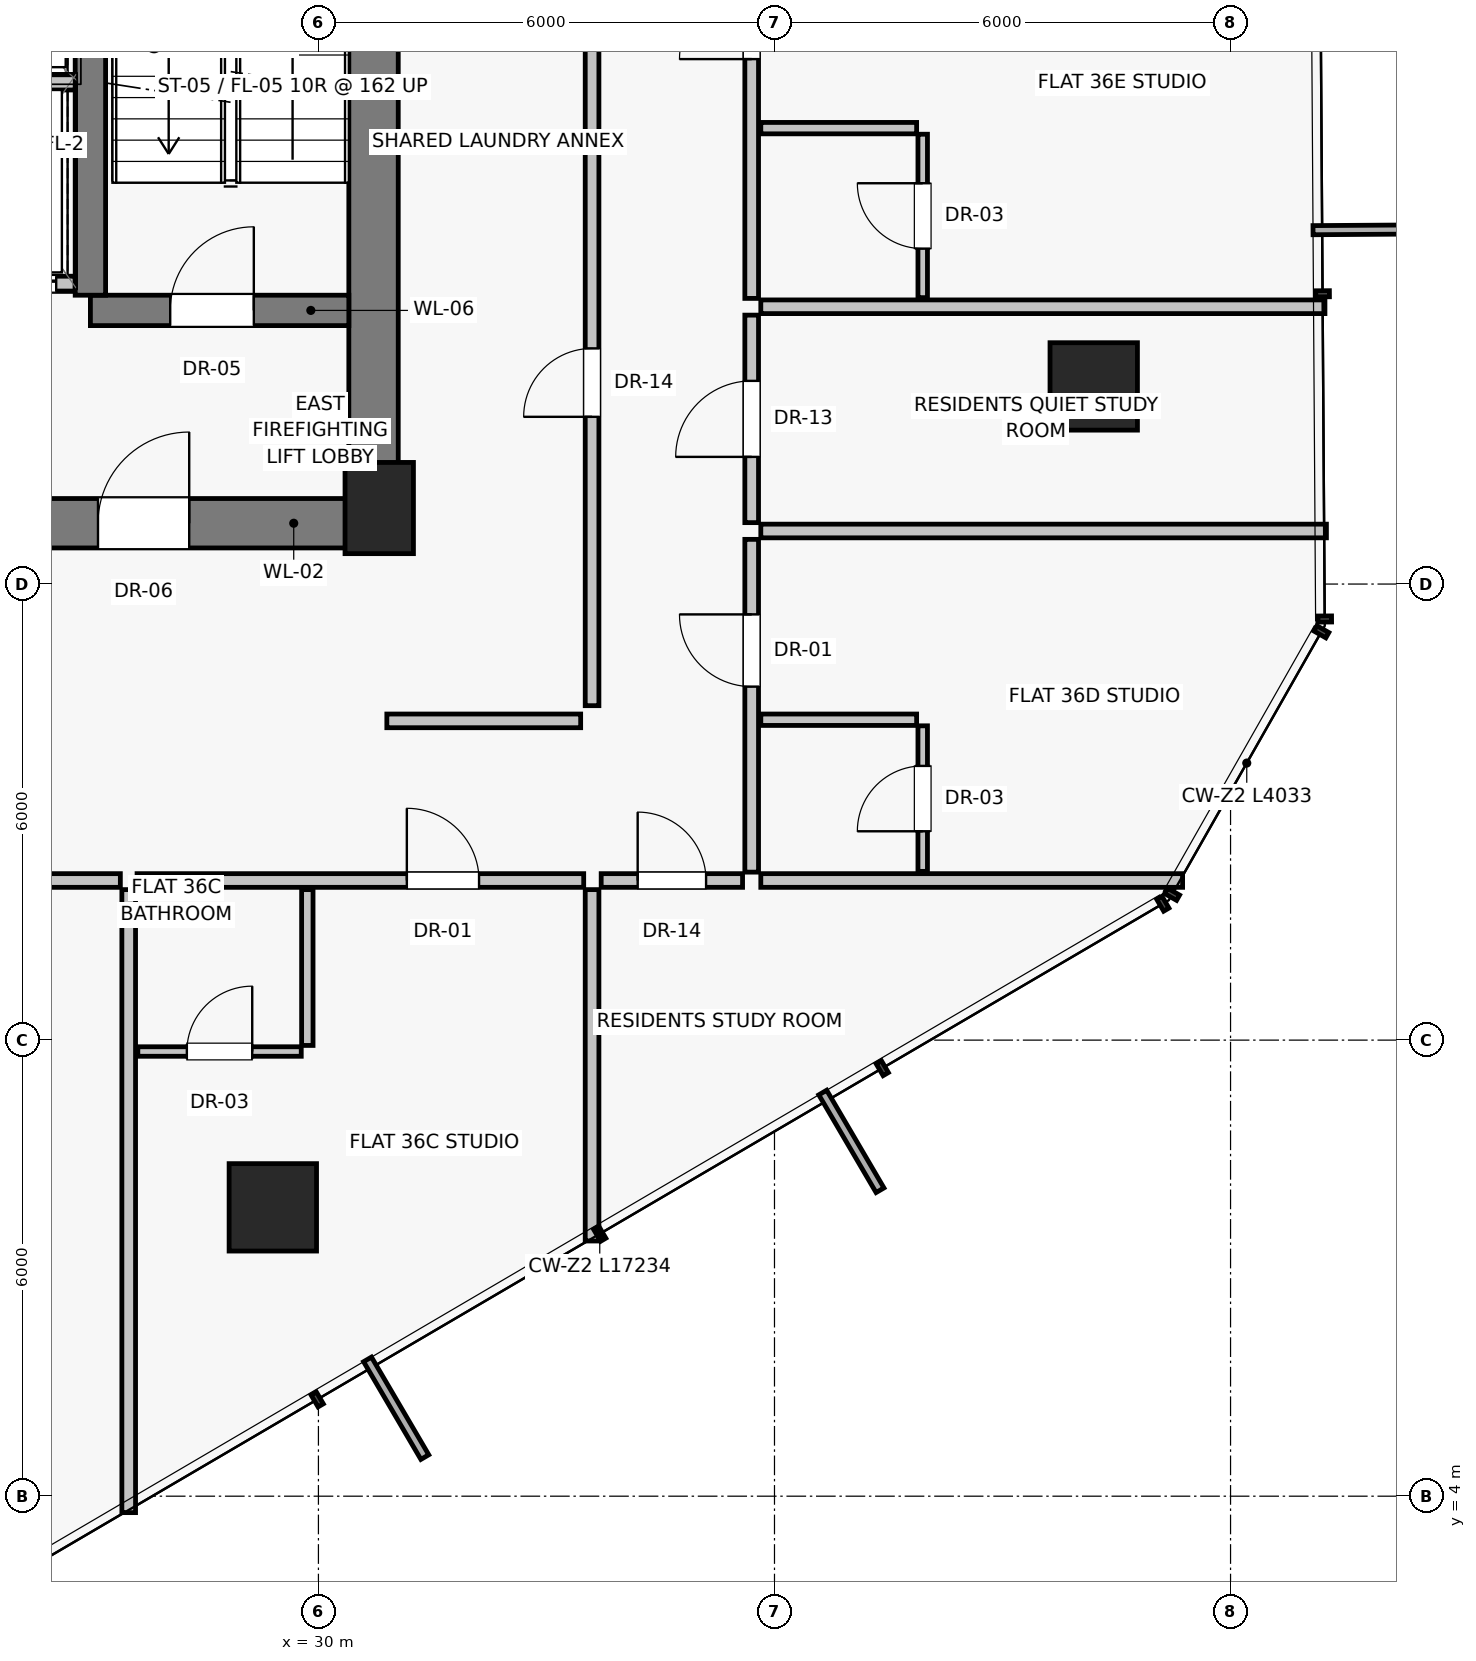
"""IFC4 building model, lengths in metres.
Left out: names, types, materials, properties, quantities, classifications, styles, units other than length and angle.
Written with IfcOpenShell. Run it as: python <this file> out.ifc"""

import sys

from ifc_helpers import new_model, si_unit, direction, frame, frame_2d, origin, origin_2d, place, context, subcontext, project, spatial, rectangle, extrude, source, transform, mapped, element, fill, save


model = new_model("IFC4")
c1 = context("Model", 3, precision=1e-05, world=origin(), true_north=direction((0.0, 1.0)))
c2 = subcontext(c1, "Body", "Model", "MODEL_VIEW")
j1 = project(units=[si_unit("LENGTHUNIT", "METRE"), si_unit("PLANEANGLEUNIT", "RADIAN")], contexts=[c1])
p1 = place(None, origin())
s1 = spatial("IfcSite", under=j1, at=p1, CompositionType="ELEMENT")
p2 = place(p1, origin())
s2 = spatial("IfcBuilding", under=s1, at=p2, CompositionType="ELEMENT")
p3 = place(p2, frame((0.0, 0.0, 129.5)))
s3 = spatial("IfcBuildingStorey", under=s2, at=p3, CompositionType="ELEMENT", Elevation=129.5)
p4 = place(p3, frame((30.8, 17.0, 0.0), z_axis=(0.0, 0.0, 1.0), x_axis=(1.0, 0.0, 0.0)))
e1 = element("IfcColumn", 1, at=p4, inside=s3, PredefinedType="PILASTER", context=c2, shape_type="SweptSolid", body=[
    extrude(rectangle(XDim=0.9, YDim=1.2, at=origin_2d()), origin(), (0.0, 0.0, 1.0), 3.25),
])
for number, where, z_axis, x_axis in (
    (2, (40.2, 18.6, 0.0), (0.0, 0.0, 1.0), (1.0, 0.0, 0.0)),
    (3, (29.4, 7.8, 0.0), (0.0, 0.0, 1.0), (1.0, 0.0, 0.0)),
):
    element("IfcColumn", number, at=place(p3, frame(where, z_axis=z_axis, x_axis=x_axis)), inside=s3, PredefinedType="COLUMN", context=c2, shape_type="SweptSolid", body=[
        extrude(rectangle(XDim=1.15, YDim=1.15, at=origin_2d()), origin(), (0.0, 0.0, 1.0), 3.25),
    ])
p5 = place(p3, frame((30.725, 16.8, 0.0), z_axis=(0.0, 0.0, 1.0), x_axis=(0.0, 1.0, 0.0)))
e4 = element("IfcWall", 4, at=p5, inside=s3, PredefinedType="SHEAR", context=c2, shape_type="SweptSolid", body=[
    extrude(rectangle(XDim=14.2, YDim=0.65, at=frame_2d((7.1, 0.0))), origin(), (0.0, 0.0, 1.0), 3.0),
])
p6 = place(p3, frame((24.95, 16.8, 0.0), z_axis=(0.0, 0.0, 1.0), x_axis=(1.0, 0.0, 0.0)))
e5 = element("IfcWall", 5, at=p6, inside=s3, PredefinedType="SHEAR", context=c2, shape_type="SweptSolid", body=[
    extrude(rectangle(XDim=5.85, YDim=0.65, at=frame_2d((2.925, 0.0))), origin(), (0.0, 0.0, 1.0), 3.0),
])
p7 = place(p6, frame((2.15, 0.0, 0.0)))
e6 = element("IfcOpeningElement", 6, at=p7, cuts=e5, PredefinedType="OPENING", context=c2, shape_type="SweptSolid", body=[
    extrude(rectangle(XDim=1.2, YDim=2.03, at=frame_2d((0.6, 1.015))), frame((0.0, 0.335, 0.0), z_axis=(0.0, -1.0, 0.0), x_axis=(1.0, 0.0, 0.0)), (0.0, 0.0, 1.0), 0.67),
])
p8 = place(p3, frame((24.95, 19.95, 0.0), z_axis=(0.0, 0.0, 1.0), x_axis=(1.0, 0.0, 0.0)))
e7 = element("IfcWall", 7, at=p8, inside=s3, PredefinedType="SOLIDWALL", context=c2, shape_type="SweptSolid", body=[
    extrude(rectangle(XDim=1.85, YDim=0.2, at=frame_2d((0.925, 0.0))), origin(), (0.0, 0.0, 1.0), 3.0),
])
p9 = place(p8, frame((0.3, 0.0, 0.0)))
e8 = element("IfcOpeningElement", 8, at=p9, cuts=e7, PredefinedType="OPENING", context=c2, shape_type="SweptSolid", body=[
    extrude(rectangle(XDim=1.3, YDim=2.25, at=frame_2d((0.65, 1.125))), frame((0.0, 0.11, 0.0), z_axis=(0.0, -1.0, 0.0), x_axis=(1.0, 0.0, 0.0)), (0.0, 0.0, 1.0), 0.22),
])
p10 = place(p3, frame((27.0, 19.6, 0.0), z_axis=(0.0, 0.0, 1.0), x_axis=(1.0, 0.0, 0.0)))
e9 = element("IfcWall", 9, at=p10, inside=s3, PredefinedType="SHEAR", context=c2, shape_type="SweptSolid", body=[
    extrude(rectangle(XDim=3.4, YDim=0.4, at=frame_2d((1.7, 0.0))), origin(), (0.0, 0.0, 1.0), 3.0),
])
p11 = place(p10, frame((1.05, 0.0, 0.0)))
e10 = element("IfcOpeningElement", 10, at=p11, cuts=e9, PredefinedType="OPENING", context=c2, shape_type="SweptSolid", body=[
    extrude(rectangle(XDim=1.1, YDim=2.03, at=frame_2d((0.55, 1.015))), frame((0.0, 0.21, 0.0), z_axis=(0.0, -1.0, 0.0), x_axis=(1.0, 0.0, 0.0)), (0.0, 0.0, 1.0), 0.42),
])
p12 = place(p3, frame((27.0, 19.8, 0.0), z_axis=(0.0, 0.0, 1.0), x_axis=(0.0, 1.0, 0.0)))
e11 = element("IfcWall", 11, at=p12, inside=s3, PredefinedType="SHEAR", context=c2, shape_type="SweptSolid", body=[
    extrude(rectangle(XDim=8.8, YDim=0.4, at=frame_2d((4.4, 0.0))), origin(), (0.0, 0.0, 1.0), 3.0),
])
p13 = place(p3, frame((24.85, 22.6, 0.0), z_axis=(0.0, 0.0, 1.0), x_axis=(1.0, 0.0, 0.0)))
e12 = element("IfcWall", 12, at=p13, inside=s3, PredefinedType="SOLIDWALL", context=c2, shape_type="SweptSolid", body=[
    extrude(rectangle(XDim=1.95, YDim=0.2, at=frame_2d((0.975, 0.0))), origin(), (0.0, 0.0, 1.0), 3.0),
])
p14 = place(p3, frame((33.6, 14.4, 0.0), z_axis=(0.0, 0.0, 1.0), x_axis=(0.0, 1.0, 0.0)))
e13 = element("IfcWall", 13, at=p14, inside=s3, PredefinedType="PARTITIONING", context=c2, shape_type="SweptSolid", body=[
    extrude(rectangle(XDim=9.4, YDim=0.18, at=frame_2d((4.7, 0.0))), origin(), (0.0, 0.0, 1.0), 3.0),
])
p15 = place(p14, frame((3.8, 0.0, 0.0)))
e14 = element("IfcOpeningElement", 14, at=p15, cuts=e13, PredefinedType="OPENING", context=c2, shape_type="SweptSolid", body=[
    extrude(rectangle(XDim=0.9, YDim=2.01, at=frame_2d((0.45, 1.005))), frame((0.0, 0.1, 0.0), z_axis=(0.0, -1.0, 0.0), x_axis=(1.0, 0.0, 0.0)), (0.0, 0.0, 1.0), 0.2),
])
p16 = place(p3, frame((30.9, 14.2, 0.0), z_axis=(0.0, 0.0, 1.0), x_axis=(1.0, 0.0, 0.0)))
e15 = element("IfcWall", 15, at=p16, inside=s3, PredefinedType="PARTITIONING", context=c2, shape_type="SweptSolid", body=[
    extrude(rectangle(XDim=2.55, YDim=0.18, at=frame_2d((1.275, 0.0))), origin(), (0.0, 0.0, 1.0), 3.0),
])
p17 = place(p3, frame((33.6, 11.98, 0.0), z_axis=(0.0, 0.0, 1.0), x_axis=(0.0, -1.0, 0.0)))
e16 = element("IfcWall", 16, at=p17, inside=s3, PredefinedType="PARTITIONING", context=c2, shape_type="SweptSolid", body=[
    extrude(rectangle(XDim=4.623, YDim=0.18, at=frame_2d((2.311, 0.0))), origin(), (0.0, 0.0, 1.0), 3.0),
])
p18 = place(p3, frame((20.606, 12.1, 0.0), z_axis=(0.0, 0.0, 1.0), x_axis=(1.0, 0.0, 0.0)))
e17 = element("IfcWall", 17, at=p18, inside=s3, PredefinedType="PARTITIONING", context=c2, shape_type="SweptSolid", body=[
    extrude(rectangle(XDim=6.788, YDim=0.18, at=frame_2d((3.394, 0.0))), origin(), (0.0, 0.0, 1.0), 2.58),
])
p19 = place(p18, frame((4.224, 0.0, 0.0)))
e18 = element("IfcOpeningElement", 18, at=p19, cuts=e17, PredefinedType="OPENING", context=c2, shape_type="SweptSolid", body=[
    extrude(rectangle(XDim=0.95, YDim=2.02, at=frame_2d((0.475, 1.01))), frame((0.0, 0.1, 0.0), z_axis=(0.0, -1.0, 0.0), x_axis=(1.0, 0.0, 0.0)), (0.0, 0.0, 1.0), 0.2),
])
p20 = place(p3, frame((27.504, 11.98, 0.0), z_axis=(0.0, 0.0, 1.0), x_axis=(0.0, -1.0, 0.0)))
e19 = element("IfcWall", 19, at=p20, inside=s3, PredefinedType="PARTITIONING", context=c2, shape_type="SweptSolid", body=[
    extrude(rectangle(XDim=8.196, YDim=0.18, at=frame_2d((4.098, 0.0))), origin(), (0.0, 0.0, 1.0), 3.0),
])
p21 = place(p3, frame((27.614, 12.1, 0.0), z_axis=(0.0, 0.0, 1.0), x_axis=(1.0, 0.0, 0.0)))
e20 = element("IfcWall", 20, at=p21, inside=s3, PredefinedType="PARTITIONING", context=c2, shape_type="SweptSolid", body=[
    extrude(rectangle(XDim=5.876, YDim=0.18, at=frame_2d((2.938, 0.0))), origin(), (0.0, 0.0, 1.0), 2.58),
])
p22 = place(p21, frame((3.549, 0.0, 0.0)))
e21 = element("IfcOpeningElement", 21, at=p22, cuts=e20, PredefinedType="OPENING", context=c2, shape_type="SweptSolid", body=[
    extrude(rectangle(XDim=0.95, YDim=2.02, at=frame_2d((0.475, 1.01))), frame((0.0, 0.1, 0.0), z_axis=(0.0, -1.0, 0.0), x_axis=(1.0, 0.0, 0.0)), (0.0, 0.0, 1.0), 0.2),
])
p23 = place(p3, frame((29.854, 11.98, 0.0), z_axis=(0.0, 0.0, 1.0), x_axis=(0.0, -1.0, 0.0)))
e22 = element("IfcWall", 22, at=p23, inside=s3, PredefinedType="PARTITIONING", context=c2, shape_type="SweptSolid", body=[
    extrude(rectangle(XDim=2.05, YDim=0.15, at=frame_2d((1.025, 0.0))), origin(), (0.0, 0.0, 1.0), 2.378),
])
p24 = place(p3, frame((27.624, 9.85, 0.0), z_axis=(0.0, 0.0, 1.0), x_axis=(1.0, 0.0, 0.0)))
e23 = element("IfcWall", 23, at=p24, inside=s3, PredefinedType="PARTITIONING", context=c2, shape_type="SweptSolid", body=[
    extrude(rectangle(XDim=2.15, YDim=0.125, at=frame_2d((1.075, 0.0))), origin(), (0.0, 0.0, 1.0), 3.0),
])
p25 = place(p24, frame((0.645, 0.0, 0.0)))
e24 = element("IfcOpeningElement", 24, at=p25, cuts=e23, PredefinedType="OPENING", context=c2, shape_type="SweptSolid", body=[
    extrude(rectangle(XDim=0.86, YDim=2.01, at=frame_2d((0.43, 1.005))), frame((0.0, 0.073, 0.0), z_axis=(0.0, -1.0, 0.0), x_axis=(1.0, 0.0, 0.0)), (0.0, 0.0, 1.0), 0.145),
])
p26 = place(p3, frame((35.82, 12.1, 0.0), z_axis=(0.0, 0.0, 1.0), x_axis=(1.0, 0.0, 0.0)))
e25 = element("IfcWall", 25, at=p26, inside=s3, PredefinedType="PARTITIONING", context=c2, shape_type="SweptSolid", body=[
    extrude(rectangle(XDim=5.549, YDim=0.18, at=frame_2d((2.775, 0.0))), origin(), (0.0, 0.0, 1.0), 3.0),
])
p27 = place(p3, frame((35.7, 16.808, 0.0), z_axis=(0.0, 0.0, 1.0), x_axis=(0.0, 1.0, 0.0)))
e26 = element("IfcWall", 26, at=p27, inside=s3, PredefinedType="PARTITIONING", context=c2, shape_type="SweptSolid", body=[
    extrude(rectangle(XDim=2.73, YDim=0.18, at=frame_2d((1.365, 0.0))), origin(), (0.0, 0.0, 1.0), 2.58),
])
p28 = place(p27, frame((0.865, 0.0, 0.0)))
e27 = element("IfcOpeningElement", 27, at=p28, cuts=e26, PredefinedType="OPENING", context=c2, shape_type="SweptSolid", body=[
    extrude(rectangle(XDim=1.0, YDim=2.01, at=frame_2d((0.5, 1.005))), frame((0.0, 0.1, 0.0), z_axis=(0.0, -1.0, 0.0), x_axis=(1.0, 0.0, 0.0)), (0.0, 0.0, 1.0), 0.2),
])
p29 = place(p3, frame((35.82, 16.698, 0.0), z_axis=(0.0, 0.0, 1.0), x_axis=(1.0, 0.0, 0.0)))
e28 = element("IfcWall", 28, at=p29, inside=s3, PredefinedType="PARTITIONING", context=c2, shape_type="SweptSolid", body=[
    extrude(rectangle(XDim=7.441, YDim=0.18, at=frame_2d((3.721, 0.0))), origin(), (0.0, 0.0, 1.0), 3.0),
])
p30 = place(p3, frame((35.7, 12.21, 0.0), z_axis=(0.0, 0.0, 1.0), x_axis=(0.0, 1.0, 0.0)))
e29 = element("IfcWall", 29, at=p30, inside=s3, PredefinedType="PARTITIONING", context=c2, shape_type="SweptSolid", body=[
    extrude(rectangle(XDim=4.378, YDim=0.18, at=frame_2d((2.189, 0.0))), origin(), (0.0, 0.0, 1.0), 3.0),
])
p31 = place(p30, frame((2.441, 0.0, 0.0)))
e30 = element("IfcOpeningElement", 30, at=p31, cuts=e29, PredefinedType="OPENING", context=c2, shape_type="SweptSolid", body=[
    extrude(rectangle(XDim=0.95, YDim=2.02, at=frame_2d((0.475, 1.01))), frame((0.0, 0.1, 0.0), z_axis=(0.0, -1.0, 0.0), x_axis=(1.0, 0.0, 0.0)), (0.0, 0.0, 1.0), 0.2),
])
p32 = place(p3, frame((35.82, 14.215, 0.0), z_axis=(0.0, 0.0, 1.0), x_axis=(1.0, 0.0, 0.0)))
e31 = element("IfcWall", 31, at=p32, inside=s3, PredefinedType="PARTITIONING", context=c2, shape_type="SweptSolid", body=[
    extrude(rectangle(XDim=2.05, YDim=0.15, at=frame_2d((1.025, 0.0))), origin(), (0.0, 0.0, 1.0), 3.0),
])
p33 = place(p3, frame((37.95, 12.22, 0.0), z_axis=(0.0, 0.0, 1.0), x_axis=(0.0, 1.0, 0.0)))
e32 = element("IfcWall", 32, at=p33, inside=s3, PredefinedType="PARTITIONING", context=c2, shape_type="SweptSolid", body=[
    extrude(rectangle(XDim=1.915, YDim=0.125, at=frame_2d((0.958, 0.0))), origin(), (0.0, 0.0, 1.0), 3.0),
])
p34 = place(p33, frame((0.528, 0.0, 0.0)))
e33 = element("IfcOpeningElement", 33, at=p34, cuts=e32, PredefinedType="OPENING", context=c2, shape_type="SweptSolid", body=[
    extrude(rectangle(XDim=0.86, YDim=2.01, at=frame_2d((0.43, 1.005))), frame((0.0, 0.073, 0.0), z_axis=(0.0, -1.0, 0.0), x_axis=(1.0, 0.0, 0.0)), (0.0, 0.0, 1.0), 0.145),
])
p35 = place(p3, frame((35.82, 19.648, 0.0), z_axis=(0.0, 0.0, 1.0), x_axis=(1.0, 0.0, 0.0)))
e34 = element("IfcWall", 34, at=p35, inside=s3, PredefinedType="PARTITIONING", context=c2, shape_type="SweptSolid", body=[
    extrude(rectangle(XDim=7.422, YDim=0.18, at=frame_2d((3.711, 0.0))), origin(), (0.0, 0.0, 1.0), 3.0),
])
p36 = place(p3, frame((35.7, 19.758, 0.0), z_axis=(0.0, 0.0, 1.0), x_axis=(0.0, 1.0, 0.0)))
e35 = element("IfcWall", 35, at=p36, inside=s3, PredefinedType="PARTITIONING", context=c2, shape_type="SweptSolid", body=[
    extrude(rectangle(XDim=5.334, YDim=0.18, at=frame_2d((2.667, 0.0))), origin(), (0.0, 0.0, 1.0), 2.58),
])
p37 = place(p36, frame((3.148, 0.0, 0.0)))
e36 = element("IfcOpeningElement", 36, at=p37, cuts=e35, PredefinedType="OPENING", context=c2, shape_type="SweptSolid", body=[
    extrude(rectangle(XDim=0.95, YDim=2.02, at=frame_2d((0.475, 1.01))), frame((0.0, 0.1, 0.0), z_axis=(0.0, -1.0, 0.0), x_axis=(1.0, 0.0, 0.0)), (0.0, 0.0, 1.0), 0.2),
])
p38 = place(p3, frame((35.82, 21.998, 0.0), z_axis=(0.0, 0.0, 1.0), x_axis=(1.0, 0.0, 0.0)))
e37 = element("IfcWall", 37, at=p38, inside=s3, PredefinedType="PARTITIONING", context=c2, shape_type="SweptSolid", body=[
    extrude(rectangle(XDim=2.05, YDim=0.15, at=frame_2d((1.025, 0.0))), origin(), (0.0, 0.0, 1.0), 3.0),
])
p39 = place(p3, frame((37.95, 19.768, 0.0), z_axis=(0.0, 0.0, 1.0), x_axis=(0.0, 1.0, 0.0)))
e38 = element("IfcWall", 38, at=p39, inside=s3, PredefinedType="PARTITIONING", context=c2, shape_type="SweptSolid", body=[
    extrude(rectangle(XDim=2.15, YDim=0.125, at=frame_2d((1.075, 0.0))), origin(), (0.0, 0.0, 1.0), 3.0),
])
p40 = place(p39, frame((0.645, 0.0, 0.0)))
e39 = element("IfcOpeningElement", 39, at=p40, cuts=e38, PredefinedType="OPENING", context=c2, shape_type="SweptSolid", body=[
    extrude(rectangle(XDim=0.86, YDim=2.01, at=frame_2d((0.43, 1.005))), frame((0.0, 0.073, 0.0), z_axis=(0.0, -1.0, 0.0), x_axis=(1.0, 0.0, 0.0)), (0.0, 0.0, 1.0), 0.145),
])
p41 = place(p3, frame((33.72, 12.1, 0.0), z_axis=(0.0, 0.0, 1.0), x_axis=(1.0, 0.0, 0.0)))
e40 = element("IfcWall", 40, at=p41, inside=s3, PredefinedType="PARTITIONING", context=c2, shape_type="SweptSolid", body=[
    extrude(rectangle(XDim=1.86, YDim=0.18, at=frame_2d((0.93, 0.0))), origin(), (0.0, 0.0, 1.0), 3.0),
])
p42 = place(p41, frame((0.48, 0.0, 0.0)))
e41 = element("IfcOpeningElement", 41, at=p42, cuts=e40, PredefinedType="OPENING", context=c2, shape_type="SweptSolid", body=[
    extrude(rectangle(XDim=0.9, YDim=2.01, at=frame_2d((0.45, 1.005))), frame((0.0, 0.1, 0.0), z_axis=(0.0, -1.0, 0.0), x_axis=(1.0, 0.0, 0.0)), (0.0, 0.0, 1.0), 0.2),
])
m1 = source(origin(), c2, "Body", "SweptSolid", [
    extrude(rectangle(XDim=1.2, YDim=2.03, at=frame_2d((0.6, 1.015))), frame((0.0, 0.025, 0.0), z_axis=(0.0, -1.0, 0.0), x_axis=(1.0, 0.0, 0.0)), (0.0, 0.0, 1.0), 0.05),
])
p43 = place(p7, origin())
e42 = element("IfcDoor", 42, at=p43, inside=s3, OperationType="SINGLE_SWING_RIGHT", PredefinedType="DOOR", context=c2, shape_type="MappedRepresentation", body=[
    mapped(m1, transform((0.0, 0.0, 0.0), scale=1.0)),
])
fill(e6, e42)
m2 = source(origin(), c2, "Body", "SweptSolid", [
    extrude(rectangle(XDim=1.3, YDim=2.25, at=frame_2d((0.65, 1.125))), frame((0.0, 0.025, 0.0), z_axis=(0.0, -1.0, 0.0), x_axis=(1.0, 0.0, 0.0)), (0.0, 0.0, 1.0), 0.05),
])
p44 = place(p9, origin())
e43 = element("IfcDoor", 43, at=p44, inside=s3, OperationType="SLIDING_TO_LEFT", PredefinedType="DOOR", context=c2, shape_type="MappedRepresentation", body=[
    mapped(m2, transform((0.0, 0.0, 0.0), scale=1.0)),
])
fill(e8, e43)
m3 = source(origin(), c2, "Body", "SweptSolid", [
    extrude(rectangle(XDim=1.1, YDim=2.03, at=frame_2d((0.55, 1.015))), frame((0.0, 0.025, 0.0), z_axis=(0.0, -1.0, 0.0), x_axis=(1.0, 0.0, 0.0)), (0.0, 0.0, 1.0), 0.05),
])
p45 = place(p11, origin())
e44 = element("IfcDoor", 44, at=p45, inside=s3, OperationType="SINGLE_SWING_RIGHT", PredefinedType="DOOR", context=c2, shape_type="MappedRepresentation", body=[
    mapped(m3, transform((0.0, 0.0, 0.0), scale=1.0)),
])
fill(e10, e44)
m4 = source(origin(), c2, "Body", "SweptSolid", [
    extrude(rectangle(XDim=0.9, YDim=2.01, at=frame_2d((0.45, 1.005))), frame((0.0, 0.025, 0.0), z_axis=(0.0, -1.0, 0.0), x_axis=(1.0, 0.0, 0.0)), (0.0, 0.0, 1.0), 0.05),
])
p46 = place(p15, origin())
e45 = element("IfcDoor", 45, at=p46, inside=s3, OperationType="SINGLE_SWING_LEFT", PredefinedType="DOOR", context=c2, shape_type="MappedRepresentation", body=[
    mapped(m4, transform((0.0, 0.0, 0.0), scale=1.0)),
])
fill(e14, e45)
m5 = source(origin(), c2, "Body", "SweptSolid", [
    extrude(rectangle(XDim=0.95, YDim=2.02, at=frame_2d((0.475, 1.01))), frame((0.0, 0.025, 0.0), z_axis=(0.0, -1.0, 0.0), x_axis=(1.0, 0.0, 0.0)), (0.0, 0.0, 1.0), 0.05),
])
p47 = place(p22, origin())
e46 = element("IfcDoor", 46, at=p47, inside=s3, OperationType="SINGLE_SWING_LEFT", PredefinedType="DOOR", context=c2, shape_type="MappedRepresentation", body=[
    mapped(m5, transform((0.0, 0.0, 0.0), scale=1.0)),
])
fill(e21, e46)
m6 = source(origin(), c2, "Body", "SweptSolid", [
    extrude(rectangle(XDim=0.86, YDim=2.01, at=frame_2d((0.43, 1.005))), frame((0.0, 0.025, 0.0), z_axis=(0.0, -1.0, 0.0), x_axis=(1.0, 0.0, 0.0)), (0.0, 0.0, 1.0), 0.05),
])
p48 = place(p25, origin())
e47 = element("IfcDoor", 47, at=p48, inside=s3, OperationType="SINGLE_SWING_RIGHT", PredefinedType="DOOR", context=c2, shape_type="MappedRepresentation", body=[
    mapped(m6, transform((0.0, 0.0, 0.0), scale=1.0)),
])
fill(e24, e47)
m7 = source(origin(), c2, "Body", "SweptSolid", [
    extrude(rectangle(XDim=1.0, YDim=2.01, at=frame_2d((0.5, 1.005))), frame((0.0, 0.025, 0.0), z_axis=(0.0, -1.0, 0.0), x_axis=(1.0, 0.0, 0.0)), (0.0, 0.0, 1.0), 0.05),
])
p49 = place(p28, origin())
e48 = element("IfcDoor", 48, at=p49, inside=s3, OperationType="SINGLE_SWING_LEFT", PredefinedType="DOOR", context=c2, shape_type="MappedRepresentation", body=[
    mapped(m7, transform((0.0, 0.0, 0.0), scale=1.0)),
])
fill(e27, e48)
p50 = place(p31, origin())
e49 = element("IfcDoor", 49, at=p50, inside=s3, OperationType="SINGLE_SWING_RIGHT", PredefinedType="DOOR", context=c2, shape_type="MappedRepresentation", body=[
    mapped(m5, transform((0.0, 0.0, 0.0), scale=1.0)),
])
fill(e30, e49)
p51 = place(p34, origin())
e50 = element("IfcDoor", 50, at=p51, inside=s3, OperationType="SINGLE_SWING_LEFT", PredefinedType="DOOR", context=c2, shape_type="MappedRepresentation", body=[
    mapped(m6, transform((0.0, 0.0, 0.0), scale=1.0)),
])
fill(e33, e50)
p52 = place(p37, origin())
e51 = element("IfcDoor", 51, at=p52, inside=s3, OperationType="SINGLE_SWING_LEFT", PredefinedType="DOOR", context=c2, shape_type="MappedRepresentation", body=[
    mapped(m5, transform((0.0, 0.0, 0.0), scale=1.0)),
])
fill(e36, e51)
p53 = place(p40, origin())
e52 = element("IfcDoor", 52, at=p53, inside=s3, OperationType="SINGLE_SWING_RIGHT", PredefinedType="DOOR", context=c2, shape_type="MappedRepresentation", body=[
    mapped(m6, transform((0.0, 0.0, 0.0), scale=1.0)),
])
fill(e39, e52)
p54 = place(p42, origin())
e53 = element("IfcDoor", 53, at=p54, inside=s3, OperationType="SINGLE_SWING_LEFT", PredefinedType="DOOR", context=c2, shape_type="MappedRepresentation", body=[
    mapped(m4, transform((0.0, 0.0, 0.0), scale=1.0)),
])
fill(e41, e53)
save(model, sys.argv[1])
